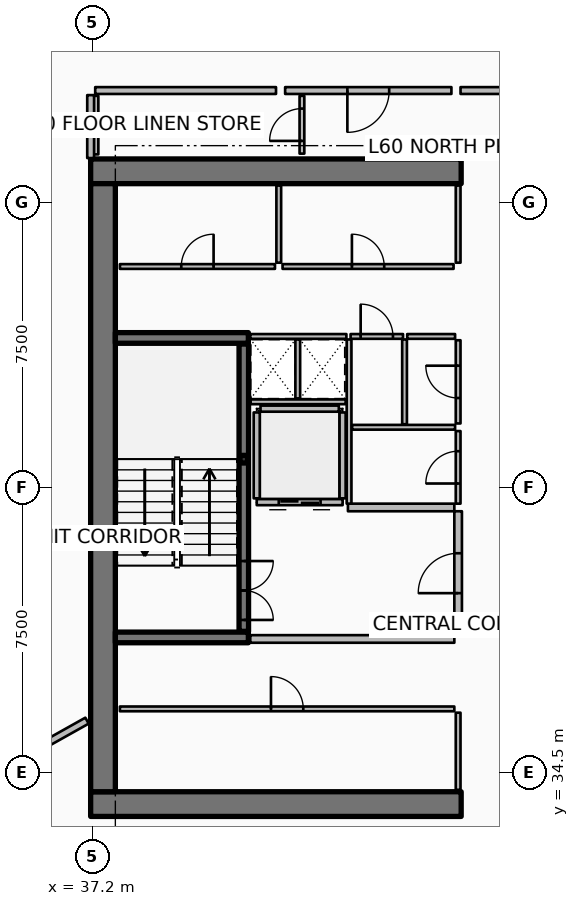
"""IFC4 building model, lengths in metres.
Left out: names, types, materials, properties, quantities, classifications, styles, units other than length and angle.
Written with IfcOpenShell. Run it as: python <this file> out.ifc"""

import sys

from ifc_helpers import new_model, si_unit, direction, frame, frame_2d, origin, origin_2d, place, context, subcontext, project, spatial, rectangle, hollow_rectangle, extrude, element, fill, save


model = new_model("IFC4")
c1 = context("Model", 3, precision=1e-05, world=origin(), true_north=direction((0.0, 1.0)))
c2 = subcontext(c1, "Body", "Model", "MODEL_VIEW")
j1 = project(units=[si_unit("LENGTHUNIT", "METRE"), si_unit("PLANEANGLEUNIT", "RADIAN")], contexts=[c1])
p1 = place(None, origin())
s1 = spatial("IfcSite", under=j1, at=p1, CompositionType="ELEMENT")
p2 = place(p1, origin())
s2 = spatial("IfcBuilding", under=s1, at=p2, CompositionType="ELEMENT")
p3 = place(p2, frame((0.0, 0.0, 240.55)))
s3 = spatial("IfcBuildingStorey", under=s2, at=p3, CompositionType="ELEMENT", Elevation=240.55)
for number, where, z_axis, x_axis in (
    (1, (37.15, 33.675, 0.0), (0.0, 0.0, 1.0), (1.0, 0.0, 0.0)),
    (2, (37.15, 50.325, 0.0), (0.0, 0.0, 1.0), (1.0, 0.0, 0.0)),
):
    element("IfcWall", number, at=place(p3, frame(where, z_axis=z_axis, x_axis=x_axis)), inside=s3, PredefinedType="SHEAR", context=c2, shape_type="SweptSolid", body=[
        extrude(rectangle(XDim=9.75, YDim=0.65, at=frame_2d((4.875, 0.0))), origin(), (0.0, 0.0, 1.0), 3.85),
    ])
p4 = place(p3, frame((37.475, 34.0, 0.0), z_axis=(0.0, 0.0, 1.0), x_axis=(0.0, 1.0, 0.0)))
e3 = element("IfcWall", 3, at=p4, inside=s3, PredefinedType="SHEAR", context=c2, shape_type="SweptSolid", body=[
    extrude(rectangle(XDim=16.0, YDim=0.65, at=frame_2d((8.0, 0.0))), origin(), (0.0, 0.0, 1.0), 3.85),
])
for number, where, z_axis, x_axis in (
    (4, (37.8, 38.06, 0.0), (0.0, 0.0, 1.0), (1.0, 0.0, 0.0)),
    (5, (37.8, 45.94, 0.0), (0.0, 0.0, 1.0), (1.0, 0.0, 0.0)),
):
    element("IfcWall", number, at=place(p3, frame(where, z_axis=z_axis, x_axis=x_axis)), inside=s3, PredefinedType="SHEAR", context=c2, shape_type="SweptSolid", body=[
        extrude(rectangle(XDim=3.5, YDim=0.28, at=frame_2d((1.75, 0.0))), origin(), (0.0, 0.0, 1.0), 3.85),
    ])
p5 = place(p3, frame((41.18, 42.75, 0.0), z_axis=(0.0, 0.0, 1.0), x_axis=(1.0, 0.0, 0.0)))
e6 = element("IfcColumn", 6, at=p5, inside=s3, PredefinedType="COLUMN", context=c2, shape_type="SweptSolid", body=[
    extrude(hollow_rectangle(XDim=0.2, YDim=0.2, WallThickness=0.01, InnerFilletRadius=0.01, OuterFilletRadius=0.02, at=origin_2d()), origin(), (0.0, 0.0, 1.0), 1.72),
])
p6 = place(p3, frame((41.18, 38.22, 0.0), z_axis=(0.0, 0.0, 1.0), x_axis=(0.0, 1.0, 0.0)))
e7 = element("IfcWall", 7, at=p6, inside=s3, PredefinedType="SOLIDWALL", context=c2, shape_type="SweptSolid", body=[
    extrude(rectangle(XDim=7.56, YDim=0.25, at=frame_2d((3.78, 0.0))), origin(), (0.0, 0.0, 1.0), 3.59),
])
p7 = place(p6, frame((0.3, 0.0, 0.0)))
e8 = element("IfcOpeningElement", 8, at=p7, cuts=e7, PredefinedType="OPENING", context=c2, shape_type="SweptSolid", body=[
    extrude(rectangle(XDim=1.55, YDim=2.15, at=frame_2d((0.775, 1.075))), frame((0.0, 0.135, 0.0), z_axis=(0.0, -1.0, 0.0), x_axis=(1.0, 0.0, 0.0)), (0.0, 0.0, 1.0), 0.27),
])
p8 = place(p3, frame((43.78, 41.62, 0.0), z_axis=(0.0, 0.0, 1.0), x_axis=(-1.0, 0.0, 0.0)))
e9 = element("IfcWall", 9, at=p8, inside=s3, PredefinedType="PARTITIONING", context=c2, shape_type="SweptSolid", body=[
    extrude(rectangle(XDim=2.26, YDim=0.16, at=frame_2d((1.13, 0.0))), origin(), (0.0, 0.0, 1.0), 3.59),
])
p9 = place(p8, frame((0.58, 0.0, 0.0)))
e10 = element("IfcOpeningElement", 10, at=p9, cuts=e9, PredefinedType="OPENING", context=c2, shape_type="SweptSolid", body=[
    extrude(rectangle(XDim=1.1, YDim=2.1, at=frame_2d((0.55, 1.05))), frame((0.0, 0.09, 0.0), z_axis=(0.0, -1.0, 0.0), x_axis=(1.0, 0.0, 0.0)), (0.0, 0.0, 1.0), 0.18),
])
for number, where, z_axis, x_axis in (
    (11, (43.78, 41.72, 0.0), (0.0, 0.0, 1.0), (0.0, 1.0, 0.0)),
    (12, (41.52, 41.72, 0.0), (0.0, 0.0, 1.0), (0.0, 1.0, 0.0)),
):
    element("IfcWall", number, at=place(p3, frame(where, z_axis=z_axis, x_axis=x_axis)), inside=s3, PredefinedType="PARTITIONING", context=c2, shape_type="SweptSolid", body=[
        extrude(rectangle(XDim=2.26, YDim=0.16, at=frame_2d((1.13, 0.0))), origin(), (0.0, 0.0, 1.0), 3.59),
    ])
p10 = place(p3, frame((41.62, 44.08, 0.0), z_axis=(0.0, 0.0, 1.0), x_axis=(1.0, 0.0, 0.0)))
e13 = element("IfcWall", 13, at=p10, inside=s3, PredefinedType="PARTITIONING", context=c2, shape_type="SweptSolid", body=[
    extrude(rectangle(XDim=2.06, YDim=0.16, at=frame_2d((1.03, 0.0))), origin(), (0.0, 0.0, 1.0), 3.59),
])
p11 = place(p3, frame((46.82, 34.05, 0.0), z_axis=(0.0, 0.0, 1.0), x_axis=(0.0, 1.0, 0.0)))
e14 = element("IfcWall", 14, at=p11, inside=s3, PredefinedType="PARTITIONING", context=c2, shape_type="SweptSolid", body=[
    extrude(rectangle(XDim=2.03, YDim=0.125, at=frame_2d((1.015, 0.0))), origin(), (0.0, 0.0, 1.0), 3.03),
])
p12 = place(p3, frame((37.92, 36.18, 0.0), z_axis=(0.0, 0.0, 1.0), x_axis=(1.0, 0.0, 0.0)))
e15 = element("IfcWall", 15, at=p12, inside=s3, PredefinedType="PARTITIONING", context=c2, shape_type="SweptSolid", body=[
    extrude(rectangle(XDim=8.8, YDim=0.125, at=frame_2d((4.4, 0.0))), origin(), (0.0, 0.0, 1.0), 3.03),
])
p13 = place(p12, frame((3.975, 0.0, 0.0)))
e16 = element("IfcOpeningElement", 16, at=p13, cuts=e15, PredefinedType="OPENING", context=c2, shape_type="SweptSolid", body=[
    extrude(rectangle(XDim=0.85, YDim=2.06, at=frame_2d((0.425, 1.03))), frame((0.0, 0.073, 0.0), z_axis=(0.0, -1.0, 0.0), x_axis=(1.0, 0.0, 0.0)), (0.0, 0.0, 1.0), 0.145),
])
for number, where, z_axis, x_axis in (
    (17, (46.82, 47.92, 0.0), (0.0, 0.0, 1.0), (0.0, 1.0, 0.0)),
    (18, (42.1, 47.92, 0.0), (0.0, 0.0, 1.0), (0.0, 1.0, 0.0)),
):
    element("IfcWall", number, at=place(p3, frame(where, z_axis=z_axis, x_axis=x_axis)), inside=s3, PredefinedType="PARTITIONING", context=c2, shape_type="SweptSolid", body=[
        extrude(rectangle(XDim=2.03, YDim=0.125, at=frame_2d((1.015, 0.0))), origin(), (0.0, 0.0, 1.0), 3.03),
    ])
p14 = place(p3, frame((37.92, 47.82, 0.0), z_axis=(0.0, 0.0, 1.0), x_axis=(1.0, 0.0, 0.0)))
e19 = element("IfcWall", 19, at=p14, inside=s3, PredefinedType="PARTITIONING", context=c2, shape_type="SweptSolid", body=[
    extrude(rectangle(XDim=4.08, YDim=0.125, at=frame_2d((2.04, 0.0))), origin(), (0.0, 0.0, 1.0), 3.03),
])
p15 = place(p14, frame((1.615, 0.0, 0.0)))
e20 = element("IfcOpeningElement", 20, at=p15, cuts=e19, PredefinedType="OPENING", context=c2, shape_type="SweptSolid", body=[
    extrude(rectangle(XDim=0.85, YDim=2.06, at=frame_2d((0.425, 1.03))), frame((0.0, 0.073, 0.0), z_axis=(0.0, -1.0, 0.0), x_axis=(1.0, 0.0, 0.0)), (0.0, 0.0, 1.0), 0.145),
])
p16 = place(p3, frame((42.2, 47.82, 0.0), z_axis=(0.0, 0.0, 1.0), x_axis=(1.0, 0.0, 0.0)))
e21 = element("IfcWall", 21, at=p16, inside=s3, PredefinedType="PARTITIONING", context=c2, shape_type="SweptSolid", body=[
    extrude(rectangle(XDim=4.5, YDim=0.125, at=frame_2d((2.25, 0.0))), origin(), (0.0, 0.0, 1.0), 3.03),
])
p17 = place(p16, frame((1.825, 0.0, 0.0)))
e22 = element("IfcOpeningElement", 22, at=p17, cuts=e21, PredefinedType="OPENING", context=c2, shape_type="SweptSolid", body=[
    extrude(rectangle(XDim=0.85, YDim=2.06, at=frame_2d((0.425, 1.03))), frame((0.0, 0.073, 0.0), z_axis=(0.0, -1.0, 0.0), x_axis=(1.0, 0.0, 0.0)), (0.0, 0.0, 1.0), 0.145),
])
p18 = place(p3, frame((41.35, 38.02, 0.0), z_axis=(0.0, 0.0, 1.0), x_axis=(1.0, 0.0, 0.0)))
e23 = element("IfcWall", 23, at=p18, inside=s3, PredefinedType="PARTITIONING", context=c2, shape_type="SweptSolid", body=[
    extrude(rectangle(XDim=5.37, YDim=0.2, at=frame_2d((2.685, 0.0))), origin(), (0.0, 0.0, 1.0), 3.59),
])
p19 = place(p3, frame((43.92, 41.48, 0.0), z_axis=(0.0, 0.0, 1.0), x_axis=(1.0, 0.0, 0.0)))
e24 = element("IfcWall", 24, at=p19, inside=s3, PredefinedType="PARTITIONING", context=c2, shape_type="SweptSolid", body=[
    extrude(rectangle(XDim=2.8, YDim=0.2, at=frame_2d((1.4, 0.0))), origin(), (0.0, 0.0, 1.0), 3.59),
])
p20 = place(p3, frame((46.82, 38.12, 0.0), z_axis=(0.0, 0.0, 1.0), x_axis=(0.0, 1.0, 0.0)))
e25 = element("IfcWall", 25, at=p20, inside=s3, PredefinedType="PARTITIONING", context=c2, shape_type="SweptSolid", body=[
    extrude(rectangle(XDim=3.26, YDim=0.2, at=frame_2d((1.63, 0.0))), origin(), (0.0, 0.0, 1.0), 3.59),
])
p21 = place(p20, frame((1.105, 0.0, 0.0)))
e26 = element("IfcOpeningElement", 26, at=p21, cuts=e25, PredefinedType="OPENING", context=c2, shape_type="SweptSolid", body=[
    extrude(rectangle(XDim=1.05, YDim=2.1, at=frame_2d((0.525, 1.05))), frame((0.0, 0.11, 0.0), z_axis=(0.0, -1.0, 0.0), x_axis=(1.0, 0.0, 0.0)), (0.0, 0.0, 1.0), 0.22),
])
p22 = place(p3, frame((41.36, 44.26, 0.0), z_axis=(0.0, 0.0, 1.0), x_axis=(1.0, 0.0, 0.0)))
e27 = element("IfcWall", 27, at=p22, inside=s3, PredefinedType="PARTITIONING", context=c2, shape_type="SweptSolid", body=[
    extrude(rectangle(XDim=2.5, YDim=0.125, at=frame_2d((1.25, 0.0))), origin(), (0.0, 0.0, 1.0), 3.03),
])
p23 = place(p3, frame((42.6, 44.35, 0.0), z_axis=(0.0, 0.0, 1.0), x_axis=(0.0, 1.0, 0.0)))
e28 = element("IfcWall", 28, at=p23, inside=s3, PredefinedType="PARTITIONING", context=c2, shape_type="SweptSolid", body=[
    extrude(rectangle(XDim=1.55, YDim=0.125, at=frame_2d((0.775, 0.0))), origin(), (0.0, 0.0, 1.0), 3.03),
])
p24 = place(p3, frame((43.95, 41.58, 0.0), z_axis=(0.0, 0.0, 1.0), x_axis=(0.0, 1.0, 0.0)))
e29 = element("IfcWall", 29, at=p24, inside=s3, PredefinedType="PARTITIONING", context=c2, shape_type="SweptSolid", body=[
    extrude(rectangle(XDim=4.32, YDim=0.125, at=frame_2d((2.16, 0.0))), origin(), (0.0, 0.0, 1.0), 3.03),
])
p25 = place(p3, frame((44.03, 43.59, 0.0), z_axis=(0.0, 0.0, 1.0), x_axis=(1.0, 0.0, 0.0)))
e30 = element("IfcWall", 30, at=p25, inside=s3, PredefinedType="PARTITIONING", context=c2, shape_type="SweptSolid", body=[
    extrude(rectangle(XDim=2.71, YDim=0.125, at=frame_2d((1.355, 0.0))), origin(), (0.0, 0.0, 1.0), 3.03),
])
p26 = place(p3, frame((45.41, 43.67, 0.0), z_axis=(0.0, 0.0, 1.0), x_axis=(0.0, 1.0, 0.0)))
e31 = element("IfcWall", 31, at=p26, inside=s3, PredefinedType="PARTITIONING", context=c2, shape_type="SweptSolid", body=[
    extrude(rectangle(XDim=2.23, YDim=0.125, at=frame_2d((1.115, 0.0))), origin(), (0.0, 0.0, 1.0), 3.03),
])
p27 = place(p3, frame((46.82, 41.58, 0.0), z_axis=(0.0, 0.0, 1.0), x_axis=(0.0, 1.0, 0.0)))
e32 = element("IfcWall", 32, at=p27, inside=s3, PredefinedType="PARTITIONING", context=c2, shape_type="SweptSolid", body=[
    extrude(rectangle(XDim=1.91, YDim=0.125, at=frame_2d((0.955, 0.0))), origin(), (0.0, 0.0, 1.0), 3.03),
])
p28 = place(p27, frame((0.53, 0.0, 0.0)))
e33 = element("IfcOpeningElement", 33, at=p28, cuts=e32, PredefinedType="OPENING", context=c2, shape_type="SweptSolid", body=[
    extrude(rectangle(XDim=0.85, YDim=2.06, at=frame_2d((0.425, 1.03))), frame((0.0, 0.073, 0.0), z_axis=(0.0, -1.0, 0.0), x_axis=(1.0, 0.0, 0.0)), (0.0, 0.0, 1.0), 0.145),
])
p29 = place(p3, frame((46.82, 43.69, 0.0), z_axis=(0.0, 0.0, 1.0), x_axis=(0.0, 1.0, 0.0)))
e34 = element("IfcWall", 34, at=p29, inside=s3, PredefinedType="PARTITIONING", context=c2, shape_type="SweptSolid", body=[
    extrude(rectangle(XDim=2.19, YDim=0.125, at=frame_2d((1.095, 0.0))), origin(), (0.0, 0.0, 1.0), 3.03),
])
p30 = place(p29, frame((0.67, 0.0, 0.0)))
e35 = element("IfcOpeningElement", 35, at=p30, cuts=e34, PredefinedType="OPENING", context=c2, shape_type="SweptSolid", body=[
    extrude(rectangle(XDim=0.85, YDim=2.06, at=frame_2d((0.425, 1.03))), frame((0.0, 0.073, 0.0), z_axis=(0.0, -1.0, 0.0), x_axis=(1.0, 0.0, 0.0)), (0.0, 0.0, 1.0), 0.145),
])
p31 = place(p3, frame((41.35, 45.98, 0.0), z_axis=(0.0, 0.0, 1.0), x_axis=(1.0, 0.0, 0.0)))
e36 = element("IfcWall", 36, at=p31, inside=s3, PredefinedType="PARTITIONING", context=c2, shape_type="SweptSolid", body=[
    extrude(rectangle(XDim=2.53, YDim=0.125, at=frame_2d((1.265, 0.0))), origin(), (0.0, 0.0, 1.0), 3.03),
])
p32 = place(p3, frame((43.99, 45.98, 0.0), z_axis=(0.0, 0.0, 1.0), x_axis=(1.0, 0.0, 0.0)))
e37 = element("IfcWall", 37, at=p32, inside=s3, PredefinedType="PARTITIONING", context=c2, shape_type="SweptSolid", body=[
    extrude(rectangle(XDim=1.38, YDim=0.125, at=frame_2d((0.69, 0.0))), origin(), (0.0, 0.0, 1.0), 3.03),
])
p33 = place(p32, frame((0.265, 0.0, 0.0)))
e38 = element("IfcOpeningElement", 38, at=p33, cuts=e37, PredefinedType="OPENING", context=c2, shape_type="SweptSolid", body=[
    extrude(rectangle(XDim=0.85, YDim=2.06, at=frame_2d((0.425, 1.03))), frame((0.0, 0.073, 0.0), z_axis=(0.0, -1.0, 0.0), x_axis=(1.0, 0.0, 0.0)), (0.0, 0.0, 1.0), 0.145),
])
p34 = place(p3, frame((45.48, 45.98, 0.0), z_axis=(0.0, 0.0, 1.0), x_axis=(1.0, 0.0, 0.0)))
e39 = element("IfcWall", 39, at=p34, inside=s3, PredefinedType="PARTITIONING", context=c2, shape_type="SweptSolid", body=[
    extrude(rectangle(XDim=1.26, YDim=0.125, at=frame_2d((0.63, 0.0))), origin(), (0.0, 0.0, 1.0), 3.03),
])
p35 = place(p3, frame((37.29, 50.77, 0.0), z_axis=(0.0, 0.0, 1.0), x_axis=(0.0, 1.0, 0.0)))
e40 = element("IfcWall", 40, at=p35, inside=s3, PredefinedType="PARTITIONING", context=c2, shape_type="SweptSolid", body=[
    extrude(rectangle(XDim=1.54, YDim=0.125, at=frame_2d((0.77, 0.0))), origin(), (0.0, 0.0, 1.0), 3.03),
])
p36 = place(p3, frame((42.71, 50.79, 0.0), z_axis=(0.0, 0.0, 1.0), x_axis=(0.0, 1.0, 0.0)))
e41 = element("IfcWall", 41, at=p36, inside=s3, PredefinedType="PARTITIONING", context=c2, shape_type="SweptSolid", body=[
    extrude(rectangle(XDim=1.52, YDim=0.125, at=frame_2d((0.76, 0.0))), origin(), (0.0, 0.0, 1.0), 2.957),
])
p37 = place(p36, frame((0.335, 0.0, 0.0)))
e42 = element("IfcOpeningElement", 42, at=p37, cuts=e41, PredefinedType="OPENING", context=c2, shape_type="SweptSolid", body=[
    extrude(rectangle(XDim=0.85, YDim=2.06, at=frame_2d((0.425, 1.03))), frame((0.0, 0.073, 0.0), z_axis=(0.0, -1.0, 0.0), x_axis=(1.0, 0.0, 0.0)), (0.0, 0.0, 1.0), 0.145),
])
p38 = place(p3, frame((37.054, 35.87, 0.0), z_axis=(0.0, 0.0, 1.0), x_axis=(-0.872490186067, -0.488631635506, 0.0)))
e43 = element("IfcWall", 43, at=p38, inside=s3, PredefinedType="PARTITIONING", context=c2, shape_type="SweptSolid", body=[
    extrude(rectangle(XDim=17.884, YDim=0.18, at=frame_2d((8.942, 0.0))), origin(), (0.0, 0.0, 1.0), 2.957),
])
p39 = place(p3, frame((46.643, 52.45, 0.0), z_axis=(0.0, 0.0, 1.0), x_axis=(-1.0, 0.0, 0.0)))
e44 = element("IfcWall", 44, at=p39, inside=s3, PredefinedType="PARTITIONING", context=c2, shape_type="SweptSolid", body=[
    extrude(rectangle(XDim=4.376, YDim=0.18, at=frame_2d((2.188, 0.0))), origin(), (0.0, 0.0, 1.0), 2.957),
])
p40 = place(p39, frame((1.638, 0.0, 0.0)))
e45 = element("IfcOpeningElement", 45, at=p40, cuts=e44, PredefinedType="OPENING", context=c2, shape_type="SweptSolid", body=[
    extrude(rectangle(XDim=1.1, YDim=2.1, at=frame_2d((0.55, 1.05))), frame((0.0, 0.1, 0.0), z_axis=(0.0, -1.0, 0.0), x_axis=(1.0, 0.0, 0.0)), (0.0, 0.0, 1.0), 0.2),
])
p41 = place(p3, frame((50.827, 52.45, 0.0), z_axis=(0.0, 0.0, 1.0), x_axis=(-1.0, 0.0, 0.0)))
e46 = element("IfcWall", 46, at=p41, inside=s3, PredefinedType="PARTITIONING", context=c2, shape_type="SweptSolid", body=[
    extrude(rectangle(XDim=3.944, YDim=0.18, at=frame_2d((1.972, 0.0))), origin(), (0.0, 0.0, 1.0), 2.957),
])
p42 = place(p3, frame((42.028, 52.45, 0.0), z_axis=(0.0, 0.0, 1.0), x_axis=(-1.0, 0.0, 0.0)))
e47 = element("IfcWall", 47, at=p42, inside=s3, PredefinedType="PARTITIONING", context=c2, shape_type="SweptSolid", body=[
    extrude(rectangle(XDim=4.758, YDim=0.18, at=frame_2d((2.379, 0.0))), origin(), (0.0, 0.0, 1.0), 2.957),
])
p43 = place(p3, frame((37.15, 52.33, 0.0), z_axis=(0.0, 0.0, 1.0), x_axis=(0.0, -1.0, 0.0)))
e48 = element("IfcWall", 48, at=p43, inside=s3, PredefinedType="PARTITIONING", context=c2, shape_type="SweptSolid", body=[
    extrude(rectangle(XDim=1.656, YDim=0.18, at=frame_2d((0.828, 0.0))), origin(), (0.0, 0.0, 1.0), 2.957),
])
p44 = place(p7, origin())
e49 = element("IfcDoor", 49, at=p44, inside=s3, OperationType="DOUBLE_DOOR_SINGLE_SWING", PredefinedType="DOOR", context=c2, shape_type="SweptSolid", body=[
    extrude(rectangle(XDim=1.55, YDim=2.15, at=frame_2d((0.775, 1.075))), frame((0.0, 0.025, 0.0), z_axis=(0.0, -1.0, 0.0), x_axis=(1.0, 0.0, 0.0)), (0.0, 0.0, 1.0), 0.05),
])
fill(e8, e49)
p45 = place(p9, origin())
e50 = element("IfcDoor", 50, at=p45, inside=s3, OperationType="DOUBLE_DOOR_SLIDING", PredefinedType="DOOR", context=c2, shape_type="SweptSolid", body=[
    extrude(rectangle(XDim=1.1, YDim=2.1, at=frame_2d((0.55, 1.05))), frame((0.0, 0.025, 0.0), z_axis=(0.0, -1.0, 0.0), x_axis=(1.0, 0.0, 0.0)), (0.0, 0.0, 1.0), 0.05),
])
fill(e10, e50)
p46 = place(p13, origin())
e51 = element("IfcDoor", 51, at=p46, inside=s3, OperationType="SINGLE_SWING_LEFT", PredefinedType="DOOR", context=c2, shape_type="SweptSolid", body=[
    extrude(rectangle(XDim=0.85, YDim=2.06, at=frame_2d((0.425, 1.03))), frame((0.0, 0.025, 0.0), z_axis=(0.0, -1.0, 0.0), x_axis=(1.0, 0.0, 0.0)), (0.0, 0.0, 1.0), 0.05),
])
fill(e16, e51)
p47 = place(p15, origin())
e52 = element("IfcDoor", 52, at=p47, inside=s3, OperationType="SINGLE_SWING_RIGHT", PredefinedType="DOOR", context=c2, shape_type="SweptSolid", body=[
    extrude(rectangle(XDim=0.85, YDim=2.06, at=frame_2d((0.425, 1.03))), frame((0.0, 0.025, 0.0), z_axis=(0.0, -1.0, 0.0), x_axis=(1.0, 0.0, 0.0)), (0.0, 0.0, 1.0), 0.05),
])
fill(e20, e52)
p48 = place(p17, origin())
e53 = element("IfcDoor", 53, at=p48, inside=s3, OperationType="SINGLE_SWING_LEFT", PredefinedType="DOOR", context=c2, shape_type="SweptSolid", body=[
    extrude(rectangle(XDim=0.85, YDim=2.06, at=frame_2d((0.425, 1.03))), frame((0.0, 0.025, 0.0), z_axis=(0.0, -1.0, 0.0), x_axis=(1.0, 0.0, 0.0)), (0.0, 0.0, 1.0), 0.05),
])
fill(e22, e53)
p49 = place(p21, origin())
e54 = element("IfcDoor", 54, at=p49, inside=s3, OperationType="SINGLE_SWING_LEFT", PredefinedType="DOOR", context=c2, shape_type="SweptSolid", body=[
    extrude(rectangle(XDim=1.05, YDim=2.1, at=frame_2d((0.525, 1.05))), frame((0.0, 0.025, 0.0), z_axis=(0.0, -1.0, 0.0), x_axis=(1.0, 0.0, 0.0)), (0.0, 0.0, 1.0), 0.05),
])
fill(e26, e54)
p50 = place(p28, origin())
e55 = element("IfcDoor", 55, at=p50, inside=s3, OperationType="SINGLE_SWING_LEFT", PredefinedType="DOOR", context=c2, shape_type="SweptSolid", body=[
    extrude(rectangle(XDim=0.85, YDim=2.06, at=frame_2d((0.425, 1.03))), frame((0.0, 0.025, 0.0), z_axis=(0.0, -1.0, 0.0), x_axis=(1.0, 0.0, 0.0)), (0.0, 0.0, 1.0), 0.05),
])
fill(e33, e55)
p51 = place(p30, origin())
e56 = element("IfcDoor", 56, at=p51, inside=s3, OperationType="SINGLE_SWING_RIGHT", PredefinedType="DOOR", context=c2, shape_type="SweptSolid", body=[
    extrude(rectangle(XDim=0.85, YDim=2.06, at=frame_2d((0.425, 1.03))), frame((0.0, 0.025, 0.0), z_axis=(0.0, -1.0, 0.0), x_axis=(1.0, 0.0, 0.0)), (0.0, 0.0, 1.0), 0.05),
])
fill(e35, e56)
p52 = place(p33, origin())
e57 = element("IfcDoor", 57, at=p52, inside=s3, OperationType="SINGLE_SWING_LEFT", PredefinedType="DOOR", context=c2, shape_type="SweptSolid", body=[
    extrude(rectangle(XDim=0.85, YDim=2.06, at=frame_2d((0.425, 1.03))), frame((0.0, 0.025, 0.0), z_axis=(0.0, -1.0, 0.0), x_axis=(1.0, 0.0, 0.0)), (0.0, 0.0, 1.0), 0.05),
])
fill(e38, e57)
p53 = place(p37, origin())
e58 = element("IfcDoor", 58, at=p53, inside=s3, OperationType="SINGLE_SWING_LEFT", PredefinedType="DOOR", context=c2, shape_type="SweptSolid", body=[
    extrude(rectangle(XDim=0.85, YDim=2.06, at=frame_2d((0.425, 1.03))), frame((0.0, 0.025, 0.0), z_axis=(0.0, -1.0, 0.0), x_axis=(1.0, 0.0, 0.0)), (0.0, 0.0, 1.0), 0.05),
])
fill(e42, e58)
p54 = place(p40, origin())
e59 = element("IfcDoor", 59, at=p54, inside=s3, OperationType="SINGLE_SWING_RIGHT", PredefinedType="DOOR", context=c2, shape_type="SweptSolid", body=[
    extrude(rectangle(XDim=1.1, YDim=2.1, at=frame_2d((0.55, 1.05))), frame((0.0, 0.025, 0.0), z_axis=(0.0, -1.0, 0.0), x_axis=(1.0, 0.0, 0.0)), (0.0, 0.0, 1.0), 0.05),
])
fill(e45, e59)
save(model, sys.argv[1])
